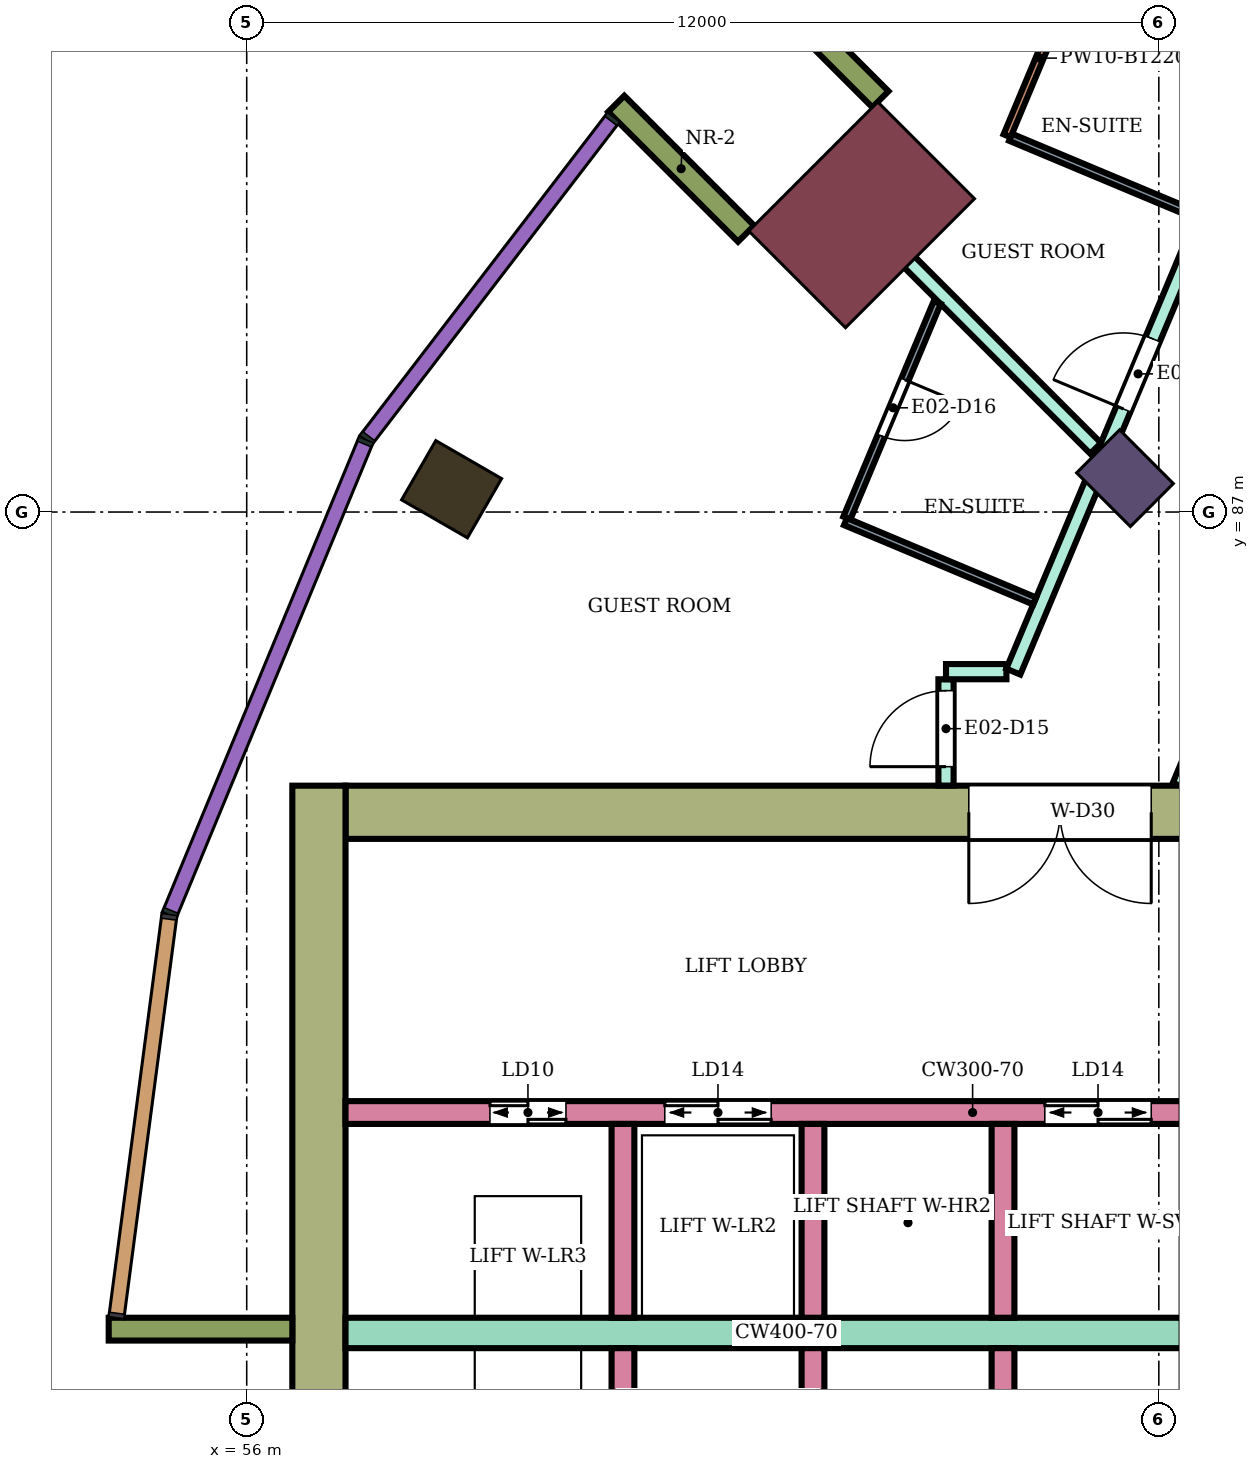
"""IFC4 building model, lengths in metres.
Left out: names, types, materials, properties, quantities, classifications, styles, units other than length and angle.
Written with IfcOpenShell. Run it as: python <this file> out.ifc"""

import sys

from ifc_helpers import new_model, si_unit, direction, frame, frame_2d, origin, origin_2d, place, context, subcontext, project, spatial, rectangle, extrude, element, fill, save


model = new_model("IFC4")
c1 = context("Model", 3, precision=1e-05, world=origin(), true_north=direction((0.0, 1.0)))
c2 = subcontext(c1, "Body", "Model", "MODEL_VIEW")
j1 = project(units=[si_unit("LENGTHUNIT", "METRE"), si_unit("PLANEANGLEUNIT", "RADIAN")], contexts=[c1])
p1 = place(None, origin())
s1 = spatial("IfcSite", under=j1, at=p1, CompositionType="ELEMENT")
p2 = place(p1, origin())
s2 = spatial("IfcBuilding", under=s1, at=p2, CompositionType="ELEMENT")
p3 = place(p2, frame((0.0, 0.0, 134.1)))
s3 = spatial("IfcBuildingStorey", under=s2, at=p3, CompositionType="ELEMENT", Elevation=134.1)
p4 = place(p3, frame((58.696, 87.3, 0.0), z_axis=(0.0, 0.0, 1.0), x_axis=(-0.866025403784, 0.5, 0.0)))
e1 = element("IfcColumn", 1, at=p4, inside=s3, PredefinedType="COLUMN", context=c2, shape_type="SweptSolid", body=[
    extrude(rectangle(XDim=1.0, YDim=0.9, at=origin_2d()), origin(), (0.0, 0.0, 1.0), 3.9),
])
p5 = place(p3, frame((67.555, 87.445, 0.0), z_axis=(0.0, 0.0, 1.0), x_axis=(-0.707106781187, 0.707106781187, 0.0)))
e2 = element("IfcColumn", 2, at=p5, inside=s3, PredefinedType="COLUMN", context=c2, shape_type="SweptSolid", body=[
    extrude(rectangle(XDim=1.0, YDim=0.8, at=origin_2d()), origin(), (0.0, 0.0, 1.0), 3.9),
])
p6 = place(p3, frame((64.09, 90.91, 0.0), z_axis=(0.0, 0.0, 1.0), x_axis=(-0.707106781187, 0.707106781187, 0.0)))
e3 = element("IfcColumn", 3, at=p6, inside=s3, PredefinedType="COLUMN", context=c2, shape_type="SweptSolid", body=[
    extrude(rectangle(XDim=1.8, YDim=2.4, at=origin_2d()), origin(), (0.0, 0.0, 1.0), 3.9),
])
p7 = place(p3, frame((72.1, 83.05, 0.0), z_axis=(0.0, 0.0, 1.0), x_axis=(-1.0, 0.0, 0.0)))
e4 = element("IfcWall", 4, at=p7, inside=s3, PredefinedType="SHEAR", context=c2, shape_type="SweptSolid", body=[
    extrude(rectangle(XDim=14.8, YDim=0.7, at=frame_2d((7.4, 0.0))), origin(), (0.0, 0.0, 1.0), 3.58),
])
p8 = place(p7, frame((4.2, 0.0, 0.0)))
e5 = element("IfcOpeningElement", 5, at=p8, cuts=e4, PredefinedType="OPENING", context=c2, shape_type="SweptSolid", body=[
    extrude(rectangle(XDim=2.4, YDim=2.4, at=frame_2d((1.2, 1.2))), frame((0.0, 0.36, 0.0), z_axis=(0.0, -1.0, 0.0), x_axis=(1.0, 0.0, 0.0)), (0.0, 0.0, 1.0), 0.72),
])
p9 = place(p3, frame((56.95, 83.4, 0.0), z_axis=(0.0, 0.0, 1.0), x_axis=(0.0, -1.0, 0.0)))
e6 = element("IfcWall", 6, at=p9, inside=s3, PredefinedType="SHEAR", context=c2, shape_type="SweptSolid", body=[
    extrude(rectangle(XDim=16.8, YDim=0.7, at=frame_2d((8.4, 0.0))), origin(), (0.0, 0.0, 1.0), 3.58),
])
p10 = place(p3, frame((68.3, 76.2, 0.0), z_axis=(0.0, 0.0, 1.0), x_axis=(-1.0, 0.0, 0.0)))
e7 = element("IfcWall", 7, at=p10, inside=s3, PredefinedType="SHEAR", context=c2, shape_type="SweptSolid", body=[
    extrude(rectangle(XDim=11.0, YDim=0.4, at=frame_2d((5.5, 0.0))), origin(), (0.0, 0.0, 1.0), 3.58),
])
p11 = place(p3, frame((68.3, 79.1, 0.0), z_axis=(0.0, 0.0, 1.0), x_axis=(-1.0, 0.0, 0.0)))
e8 = element("IfcWall", 8, at=p11, inside=s3, PredefinedType="SHEAR", context=c2, shape_type="SweptSolid", body=[
    extrude(rectangle(XDim=11.0, YDim=0.3, at=frame_2d((5.5, 0.0))), origin(), (0.0, 0.0, 1.0), 3.58),
])
p12 = place(p11, frame((0.4, 0.0, 0.0)))
e9 = element("IfcOpeningElement", 9, at=p12, cuts=e8, PredefinedType="OPENING", context=c2, shape_type="SweptSolid", body=[
    extrude(rectangle(XDim=1.4, YDim=2.1, at=frame_2d((0.7, 1.05))), frame((0.0, 0.16, 0.0), z_axis=(0.0, -1.0, 0.0), x_axis=(1.0, 0.0, 0.0)), (0.0, 0.0, 1.0), 0.32),
])
p13 = place(p11, frame((5.4, 0.0, 0.0)))
e10 = element("IfcOpeningElement", 10, at=p13, cuts=e8, PredefinedType="OPENING", context=c2, shape_type="SweptSolid", body=[
    extrude(rectangle(XDim=1.4, YDim=2.1, at=frame_2d((0.7, 1.05))), frame((0.0, 0.16, 0.0), z_axis=(0.0, -1.0, 0.0), x_axis=(1.0, 0.0, 0.0)), (0.0, 0.0, 1.0), 0.32),
])
p14 = place(p11, frame((8.1, 0.0, 0.0)))
e11 = element("IfcOpeningElement", 11, at=p14, cuts=e8, PredefinedType="OPENING", context=c2, shape_type="SweptSolid", body=[
    extrude(rectangle(XDim=1.0, YDim=2.1, at=frame_2d((0.5, 1.05))), frame((0.0, 0.16, 0.0), z_axis=(0.0, -1.0, 0.0), x_axis=(1.0, 0.0, 0.0)), (0.0, 0.0, 1.0), 0.32),
])
for number, where, z_axis, x_axis in (
    (12, (65.95, 76.0, 0.0), (0.0, 0.0, 1.0), (0.0, -1.0, 0.0)),
    (13, (63.45, 76.0, 0.0), (0.0, 0.0, 1.0), (0.0, -1.0, 0.0)),
    (14, (60.95, 76.0, 0.0), (0.0, 0.0, 1.0), (0.0, -1.0, 0.0)),
    (15, (65.95, 78.95, 0.0), (0.0, 0.0, 1.0), (0.0, -1.0, 0.0)),
    (16, (63.45, 78.95, 0.0), (0.0, 0.0, 1.0), (0.0, -1.0, 0.0)),
    (17, (60.95, 78.95, 0.0), (0.0, 0.0, 1.0), (0.0, -1.0, 0.0)),
):
    element("IfcWall", number, at=place(p3, frame(where, z_axis=z_axis, x_axis=x_axis)), inside=s3, PredefinedType="SHEAR", context=c2, shape_type="SweptSolid", body=[
        extrude(rectangle(XDim=2.55, YDim=0.3, at=frame_2d((1.275, 0.0))), origin(), (0.0, 0.0, 1.0), 3.58),
    ])
for number, where, z_axis, x_axis in (
    (18, (64.338, 92.43, 0.0), (0.0, 0.0, 1.0), (-0.707, 0.707, 0.0)),
    (19, (62.57, 90.662, 0.0), (0.0, 0.0, 1.0), (-0.707, 0.707, 0.0)),
    (20, (56.6, 76.25, 0.0), (0.0, 0.0, 1.0), (-1.0, 0.0, 0.0)),
):
    element("IfcWall", number, at=place(p3, frame(where, z_axis=z_axis, x_axis=x_axis)), inside=s3, PredefinedType="NOTDEFINED", context=c2, shape_type="SweptSolid", body=[
        extrude(rectangle(XDim=2.416, YDim=0.3, at=frame_2d((1.208, 0.0))), origin(), (0.0, 0.0, 1.0), 3.9),
    ])
p15 = place(p3, frame((63.6, 91.409, 0.0), z_axis=(0.0, 0.0, 1.0), x_axis=(0.706937509868, -0.707276011993, 0.0)))
e21 = element("IfcWall", 21, at=p15, inside=s3, PredefinedType="PARTITIONING", context=c2, shape_type="SweptSolid", body=[
    extrude(rectangle(XDim=5.049, YDim=0.2, at=frame_2d((2.524, 0.0))), origin(), (0.0, 0.0, 1.0), 3.45),
])
p16 = place(p3, frame((65.2, 83.401, 0.0), z_axis=(0.0, 0.0, 1.0), x_axis=(0.0, 1.0, 0.0)))
e22 = element("IfcWall", 22, at=p16, inside=s3, PredefinedType="PARTITIONING", context=c2, shape_type="SweptSolid", body=[
    extrude(rectangle(XDim=1.399, YDim=0.2, at=frame_2d((0.7, 0.0))), origin(), (0.0, 0.0, 1.0), 3.45),
])
p17 = place(p16, frame((0.249, 0.0, 0.0)))
e23 = element("IfcOpeningElement", 23, at=p17, cuts=e22, PredefinedType="OPENING", context=c2, shape_type="SweptSolid", body=[
    extrude(rectangle(XDim=1.0, YDim=2.1, at=frame_2d((0.5, 1.05))), frame((0.0, 0.11, 0.0), z_axis=(0.0, -1.0, 0.0), x_axis=(1.0, 0.0, 0.0)), (0.0, 0.0, 1.0), 0.22),
])
p18 = place(p3, frame((65.2, 84.9, 0.0), z_axis=(0.0, 0.0, 1.0), x_axis=(1.0, 0.0, 0.0)))
e24 = element("IfcWall", 24, at=p18, inside=s3, PredefinedType="PARTITIONING", context=c2, shape_type="SweptSolid", body=[
    extrude(rectangle(XDim=0.795, YDim=0.2, at=frame_2d((0.397, 0.0))), origin(), (0.0, 0.0, 1.0), 3.45),
])
p19 = place(p3, frame((66.085, 84.9, 0.0), z_axis=(0.0, 0.0, 1.0), x_axis=(0.386617151403, 0.922240303956, 0.0)))
e25 = element("IfcWall", 25, at=p19, inside=s3, PredefinedType="PARTITIONING", context=c2, shape_type="SweptSolid", body=[
    extrude(rectangle(XDim=8.5, YDim=0.2, at=frame_2d((4.25, 0.0))), origin(), (0.0, 0.0, 1.0), 3.45),
])
p20 = place(p19, frame((3.748, 0.0, 0.0)))
e26 = element("IfcOpeningElement", 26, at=p20, cuts=e25, PredefinedType="OPENING", context=c2, shape_type="SweptSolid", body=[
    extrude(rectangle(XDim=1.0, YDim=2.1, at=frame_2d((0.5, 1.05))), frame((0.0, 0.11, 0.0), z_axis=(0.0, -1.0, 0.0), x_axis=(1.0, 0.0, 0.0)), (0.0, 0.0, 1.0), 0.22),
])
p21 = place(p3, frame((67.104, 97.343, 0.0), z_axis=(0.0, 0.0, 1.0), x_axis=(0.499893606134, -0.866086821598, 0.0)))
e27 = element("IfcWall", 27, at=p21, inside=s3, PredefinedType="PARTITIONING", context=c2, shape_type="SweptSolid", body=[
    extrude(rectangle(XDim=5.021, YDim=0.2, at=frame_2d((2.511, 0.0))), origin(), (0.0, 0.0, 1.0), 3.45),
])
p22 = place(p3, frame((68.277, 83.4, 0.0), z_axis=(0.0, 0.0, 1.0), x_axis=(0.386454861164, 0.922308321703, 0.0)))
e28 = element("IfcWall", 28, at=p22, inside=s3, PredefinedType="PARTITIONING", context=c2, shape_type="SweptSolid", body=[
    extrude(rectangle(XDim=7.762, YDim=0.2, at=frame_2d((3.881, 0.0))), origin(), (0.0, 0.0, 1.0), 3.45),
])
p23 = place(p22, frame((5.351, 0.0, 0.0)))
e29 = element("IfcOpeningElement", 29, at=p23, cuts=e28, PredefinedType="OPENING", context=c2, shape_type="SweptSolid", body=[
    extrude(rectangle(XDim=1.0, YDim=2.1, at=frame_2d((0.5, 1.05))), frame((0.0, 0.11, 0.0), z_axis=(0.0, -1.0, 0.0), x_axis=(1.0, 0.0, 0.0)), (0.0, 0.0, 1.0), 0.22),
])
p24 = place(p3, frame((63.896, 86.92, 0.0), z_axis=(0.0, 0.0, 1.0), x_axis=(0.386637413037, 0.922231809709, 0.0)))
e30 = element("IfcWall", 30, at=p24, inside=s3, PredefinedType="PARTITIONING", context=c2, shape_type="SweptSolid", body=[
    extrude(rectangle(XDim=3.076, YDim=0.1, at=frame_2d((1.538, 0.0))), origin(), (0.0, 0.0, 1.0), 3.45),
])
p25 = place(p24, frame((1.173, 0.0, 0.0)))
e31 = element("IfcOpeningElement", 31, at=p25, cuts=e30, PredefinedType="OPENING", context=c2, shape_type="SweptSolid", body=[
    extrude(rectangle(XDim=0.8, YDim=2.1, at=frame_2d((0.4, 1.05))), frame((0.0, 0.06, 0.0), z_axis=(0.0, -1.0, 0.0), x_axis=(1.0, 0.0, 0.0)), (0.0, 0.0, 1.0), 0.12),
])
p26 = place(p3, frame((63.877, 86.874, 0.0), z_axis=(0.0, 0.0, 1.0), x_axis=(0.92214860299, -0.386835823062, 0.0)))
e32 = element("IfcWall", 32, at=p26, inside=s3, PredefinedType="PARTITIONING", context=c2, shape_type="SweptSolid", body=[
    extrude(rectangle(XDim=2.7, YDim=0.1, at=frame_2d((1.35, 0.0))), origin(), (0.0, 0.0, 1.0), 3.45),
])
p27 = place(p3, frame((66.049, 91.931, 0.0), z_axis=(0.0, 0.0, 1.0), x_axis=(0.922344808264, -0.38636777126, 0.0)))
e33 = element("IfcWall", 33, at=p27, inside=s3, PredefinedType="PARTITIONING", context=c2, shape_type="SweptSolid", body=[
    extrude(rectangle(XDim=2.65, YDim=0.1, at=frame_2d((1.325, 0.0))), origin(), (0.0, 0.0, 1.0), 3.45),
])
p28 = place(p3, frame((66.004, 91.95, 0.0), z_axis=(0.0, 0.0, 1.0), x_axis=(0.386601257709, 0.922246966673, 0.0)))
e34 = element("IfcWall", 34, at=p28, inside=s3, PredefinedType="PARTITIONING", context=c2, shape_type="SweptSolid", body=[
    extrude(rectangle(XDim=4.433, YDim=0.1, at=frame_2d((2.216, 0.0))), origin(), (0.0, 0.0, 1.0), 2.68),
])
p29 = place(p28, frame((1.891, 0.0, 0.0)))
e35 = element("IfcOpeningElement", 35, at=p29, cuts=e34, PredefinedType="OPENING", context=c2, shape_type="SweptSolid", body=[
    extrude(rectangle(XDim=0.8, YDim=2.1, at=frame_2d((0.4, 1.05))), frame((0.0, 0.06, 0.0), z_axis=(0.0, -1.0, 0.0), x_axis=(1.0, 0.0, 0.0)), (0.0, 0.0, 1.0), 0.12),
])
p30 = place(p20, origin())
e36 = element("IfcDoor", 36, at=p30, inside=s3, OperationType="SINGLE_SWING_LEFT", PredefinedType="DOOR", context=c2, shape_type="SweptSolid", body=[
    extrude(rectangle(XDim=1.0, YDim=2.1, at=frame_2d((0.5, 1.05))), frame((0.0, 0.025, 0.0), z_axis=(0.0, -1.0, 0.0), x_axis=(1.0, 0.0, 0.0)), (0.0, 0.0, 1.0), 0.05),
])
fill(e26, e36)
p31 = place(p17, origin())
e37 = element("IfcDoor", 37, at=p31, inside=s3, OperationType="SINGLE_SWING_LEFT", PredefinedType="DOOR", context=c2, shape_type="SweptSolid", body=[
    extrude(rectangle(XDim=1.0, YDim=2.1, at=frame_2d((0.5, 1.05))), frame((0.0, 0.025, 0.0), z_axis=(0.0, -1.0, 0.0), x_axis=(1.0, 0.0, 0.0)), (0.0, 0.0, 1.0), 0.05),
])
fill(e23, e37)
p32 = place(p25, frame((0.8, 0.0, 0.0), z_axis=(0.0, 0.0, 1.0), x_axis=(-1.0, 0.0, 0.0)))
e38 = element("IfcDoor", 38, at=p32, inside=s3, OperationType="SINGLE_SWING_LEFT", PredefinedType="DOOR", context=c2, shape_type="SweptSolid", body=[
    extrude(rectangle(XDim=0.8, YDim=2.1, at=frame_2d((0.4, 1.05))), frame((0.0, 0.025, 0.0), z_axis=(0.0, -1.0, 0.0), x_axis=(1.0, 0.0, 0.0)), (0.0, 0.0, 1.0), 0.05),
])
fill(e31, e38)
p33 = place(p12, origin())
e39 = element("IfcDoor", 39, at=p33, inside=s3, OperationType="DOUBLE_DOOR_SLIDING", PredefinedType="DOOR", context=c2, shape_type="SweptSolid", body=[
    extrude(rectangle(XDim=1.4, YDim=2.1, at=frame_2d((0.7, 1.05))), frame((0.0, 0.025, 0.0), z_axis=(0.0, -1.0, 0.0), x_axis=(1.0, 0.0, 0.0)), (0.0, 0.0, 1.0), 0.05),
])
fill(e9, e39)
p34 = place(p13, origin())
e40 = element("IfcDoor", 40, at=p34, inside=s3, OperationType="DOUBLE_DOOR_SLIDING", PredefinedType="DOOR", context=c2, shape_type="SweptSolid", body=[
    extrude(rectangle(XDim=1.4, YDim=2.1, at=frame_2d((0.7, 1.05))), frame((0.0, 0.025, 0.0), z_axis=(0.0, -1.0, 0.0), x_axis=(1.0, 0.0, 0.0)), (0.0, 0.0, 1.0), 0.05),
])
fill(e10, e40)
p35 = place(p14, origin())
e41 = element("IfcDoor", 41, at=p35, inside=s3, OperationType="DOUBLE_DOOR_SLIDING", PredefinedType="DOOR", context=c2, shape_type="SweptSolid", body=[
    extrude(rectangle(XDim=1.0, YDim=2.1, at=frame_2d((0.5, 1.05))), frame((0.0, 0.025, 0.0), z_axis=(0.0, -1.0, 0.0), x_axis=(1.0, 0.0, 0.0)), (0.0, 0.0, 1.0), 0.05),
])
fill(e11, e41)
p36 = place(p8, origin())
e42 = element("IfcDoor", 42, at=p36, inside=s3, OperationType="DOUBLE_DOOR_SINGLE_SWING", PredefinedType="DOOR", context=c2, shape_type="SweptSolid", body=[
    extrude(rectangle(XDim=2.4, YDim=2.4, at=frame_2d((1.2, 1.2))), frame((0.0, 0.025, 0.0), z_axis=(0.0, -1.0, 0.0), x_axis=(1.0, 0.0, 0.0)), (0.0, 0.0, 1.0), 0.05),
])
fill(e5, e42)
save(model, sys.argv[1])
